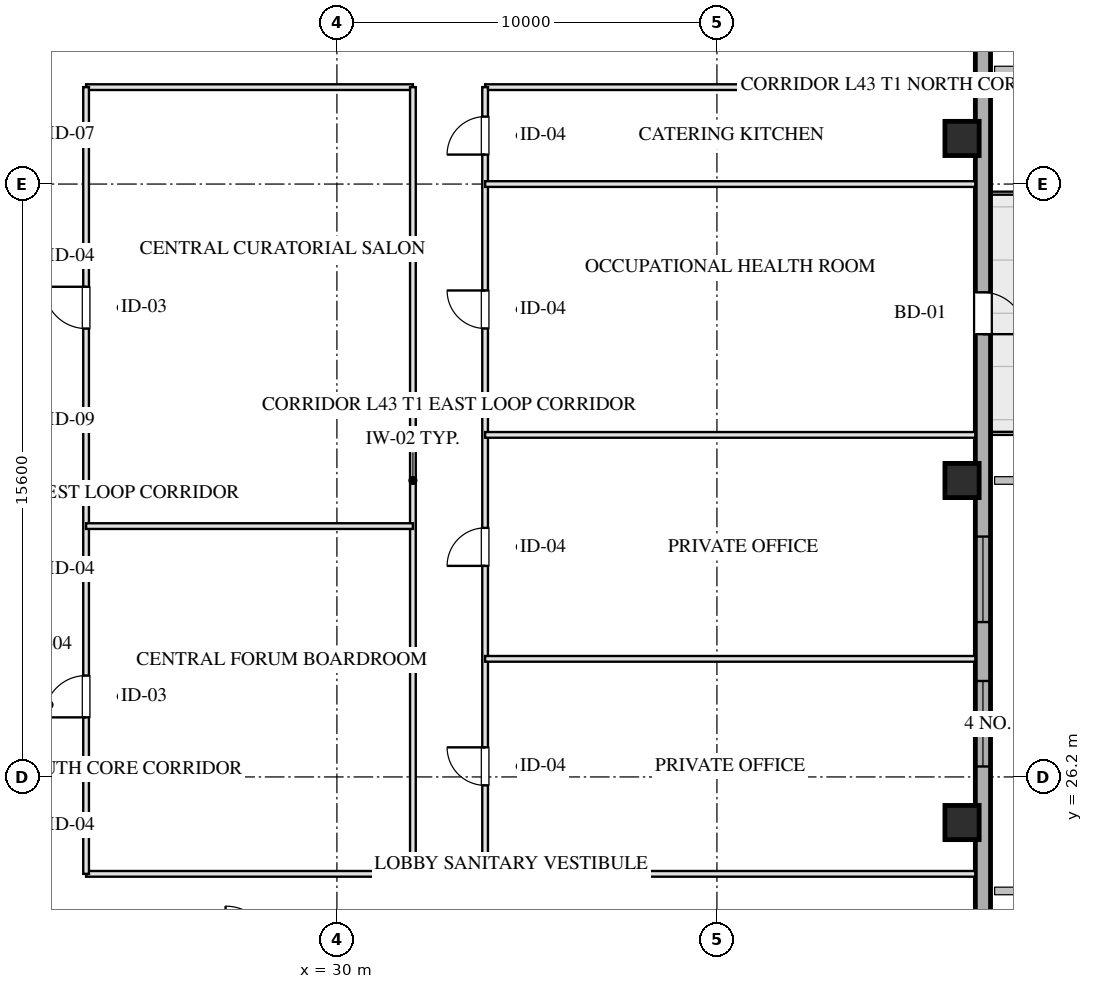
"""IFC4 building model, lengths in metres.
Left out: names, types, materials, properties, quantities, classifications, styles, units other than length and angle.
Written with IfcOpenShell. Run it as: python <this file> out.ifc"""

import sys

from ifc_helpers import new_model, si_unit, direction, frame, frame_2d, origin, origin_2d, place, context, subcontext, project, spatial, rectangle, hollow_rectangle, extrude, element, fill, save


model = new_model("IFC4")
c1 = context("Model", 3, precision=1e-05, world=origin(), true_north=direction((0.0, 1.0)))
c2 = subcontext(c1, "Body", "Model", "MODEL_VIEW")
j1 = project(units=[si_unit("LENGTHUNIT", "METRE"), si_unit("PLANEANGLEUNIT", "RADIAN")], contexts=[c1])
p1 = place(None, origin())
s1 = spatial("IfcSite", under=j1, at=p1, CompositionType="ELEMENT")
p2 = place(p1, origin())
s2 = spatial("IfcBuilding", under=s1, at=p2, CompositionType="ELEMENT")
p3 = place(p2, frame((0.0, 0.0, 163.3)))
s3 = spatial("IfcBuildingStorey", under=s2, at=p3, CompositionType="ELEMENT", Elevation=163.3)
for number, where, z_axis, x_axis in (
    (1, (46.45, 25.0, 0.0), (0.0, 0.0, 1.0), (1.0, 0.0, 0.0)),
    (2, (46.45, 34.0, 0.0), (0.0, 0.0, 1.0), (1.0, 0.0, 0.0)),
    (3, (46.45, 43.0, 0.0), (0.0, 0.0, 1.0), (1.0, 0.0, 0.0)),
):
    element("IfcColumn", number, at=place(p3, frame(where, z_axis=z_axis, x_axis=x_axis)), inside=s3, PredefinedType="COLUMN", context=c2, shape_type="SweptSolid", body=[
        extrude(hollow_rectangle(XDim=0.9, YDim=0.9, WallThickness=0.032, at=origin_2d()), origin(), (0.0, 0.0, 1.0), 3.451),
    ])
p4 = place(p3, frame((47.0, 57.2, 0.0), z_axis=(0.0, 0.0, 1.0), x_axis=(0.0, -1.0, 0.0)))
e4 = element("IfcWall", 4, at=p4, inside=s3, PredefinedType="SOLIDWALL", context=c2, shape_type="SweptSolid", body=[
    extrude(rectangle(XDim=46.4, YDim=0.4, at=frame_2d((23.2, 0.0))), origin(), (0.0, 0.0, 1.0), 2.61),
])
p5 = place(p4, frame((28.475, 0.0, 0.75)))
e5 = element("IfcOpeningElement", 5, at=p5, cuts=e4, PredefinedType="OPENING", context=c2, shape_type="SweptSolid", body=[
    extrude(rectangle(XDim=2.25, YDim=1.46, at=frame_2d((1.125, 0.73))), frame((0.0, 0.21, 0.0), z_axis=(0.0, -1.0, 0.0), x_axis=(1.0, 0.0, 0.0)), (0.0, 0.0, 1.0), 0.42),
])
p6 = place(p4, frame((24.675, 0.0, 0.75)))
e6 = element("IfcOpeningElement", 6, at=p6, cuts=e4, PredefinedType="OPENING", context=c2, shape_type="SweptSolid", body=[
    extrude(rectangle(XDim=2.25, YDim=1.46, at=frame_2d((1.125, 0.73))), frame((0.0, 0.21, 0.0), z_axis=(0.0, -1.0, 0.0), x_axis=(1.0, 0.0, 0.0)), (0.0, 0.0, 1.0), 0.42),
])
p7 = place(p4, frame((18.25, 0.0, 0.0)))
e7 = element("IfcOpeningElement", 7, at=p7, cuts=e4, PredefinedType="OPENING", context=c2, shape_type="SweptSolid", body=[
    extrude(rectangle(XDim=1.1, YDim=2.15, at=frame_2d((0.55, 1.075))), frame((0.0, 0.21, 0.0), z_axis=(0.0, -1.0, 0.0), x_axis=(1.0, 0.0, 0.0)), (0.0, 0.0, 1.0), 0.42),
])
p8 = place(p3, frame((23.4, 23.65, 0.0), z_axis=(0.0, 0.0, 1.0), x_axis=(1.0, 0.0, 0.0)))
e8 = element("IfcWall", 8, at=p8, inside=s3, PredefinedType="PARTITIONING", context=c2, shape_type="SweptSolid", body=[
    extrude(rectangle(XDim=8.6, YDim=0.15, at=frame_2d((4.3, 0.0))), origin(), (0.0, 0.0, 1.0), 3.175),
])
p9 = place(p3, frame((33.9, 23.65, 0.0), z_axis=(0.0, 0.0, 1.0), x_axis=(1.0, 0.0, 0.0)))
e9 = element("IfcWall", 9, at=p9, inside=s3, PredefinedType="PARTITIONING", context=c2, shape_type="SweptSolid", body=[
    extrude(rectangle(XDim=12.9, YDim=0.15, at=frame_2d((6.45, 0.0))), origin(), (0.0, 0.0, 1.0), 3.175),
])
p10 = place(p3, frame((23.4, 44.35, 0.0), z_axis=(0.0, 0.0, 1.0), x_axis=(1.0, 0.0, 0.0)))
e10 = element("IfcWall", 10, at=p10, inside=s3, PredefinedType="PARTITIONING", context=c2, shape_type="SweptSolid", body=[
    extrude(rectangle(XDim=8.6, YDim=0.15, at=frame_2d((4.3, 0.0))), origin(), (0.0, 0.0, 1.0), 3.175),
])
p11 = place(p3, frame((33.9, 44.35, 0.0), z_axis=(0.0, 0.0, 1.0), x_axis=(1.0, 0.0, 0.0)))
e11 = element("IfcWall", 11, at=p11, inside=s3, PredefinedType="PARTITIONING", context=c2, shape_type="SweptSolid", body=[
    extrude(rectangle(XDim=12.9, YDim=0.15, at=frame_2d((6.45, 0.0))), origin(), (0.0, 0.0, 1.0), 3.175),
])
p12 = place(p3, frame((23.4, 23.65, 0.0), z_axis=(0.0, 0.0, 1.0), x_axis=(0.0, 1.0, 0.0)))
e12 = element("IfcWall", 12, at=p12, inside=s3, PredefinedType="PARTITIONING", context=c2, shape_type="SweptSolid", body=[
    extrude(rectangle(XDim=20.7, YDim=0.15, at=frame_2d((10.35, 0.0))), origin(), (0.0, 0.0, 1.0), 3.175),
])
p13 = place(p12, frame((4.117, 0.0, 0.0)))
e13 = element("IfcOpeningElement", 13, at=p13, cuts=e12, PredefinedType="OPENING", context=c2, shape_type="SweptSolid", body=[
    extrude(rectangle(XDim=1.1, YDim=2.05, at=frame_2d((0.55, 1.025))), frame((0.0, 0.085, 0.0), z_axis=(0.0, -1.0, 0.0), x_axis=(1.0, 0.0, 0.0)), (0.0, 0.0, 1.0), 0.17),
])
p14 = place(p12, frame((14.347, 0.0, 0.0)))
e14 = element("IfcOpeningElement", 14, at=p14, cuts=e12, PredefinedType="OPENING", context=c2, shape_type="SweptSolid", body=[
    extrude(rectangle(XDim=1.1, YDim=2.05, at=frame_2d((0.55, 1.025))), frame((0.0, 0.085, 0.0), z_axis=(0.0, -1.0, 0.0), x_axis=(1.0, 0.0, 0.0)), (0.0, 0.0, 1.0), 0.17),
])
p15 = place(p3, frame((32.0, 23.65, 0.0), z_axis=(0.0, 0.0, 1.0), x_axis=(0.0, 1.0, 0.0)))
e15 = element("IfcWall", 15, at=p15, inside=s3, PredefinedType="PARTITIONING", context=c2, shape_type="SweptSolid", body=[
    extrude(rectangle(XDim=20.7, YDim=0.15, at=frame_2d((10.35, 0.0))), origin(), (0.0, 0.0, 1.0), 3.175),
])
p16 = place(p3, frame((33.9, 23.65, 0.0), z_axis=(0.0, 0.0, 1.0), x_axis=(0.0, 1.0, 0.0)))
e16 = element("IfcWall", 16, at=p16, inside=s3, PredefinedType="PARTITIONING", context=c2, shape_type="SweptSolid", body=[
    extrude(rectangle(XDim=20.7, YDim=0.15, at=frame_2d((10.35, 0.0))), origin(), (0.0, 0.0, 1.0), 3.175),
])
p17 = place(p16, frame((2.329, 0.0, 0.0)))
e17 = element("IfcOpeningElement", 17, at=p17, cuts=e16, PredefinedType="OPENING", context=c2, shape_type="SweptSolid", body=[
    extrude(rectangle(XDim=1.0, YDim=2.05, at=frame_2d((0.5, 1.025))), frame((0.0, 0.085, 0.0), z_axis=(0.0, -1.0, 0.0), x_axis=(1.0, 0.0, 0.0)), (0.0, 0.0, 1.0), 0.17),
])
p18 = place(p16, frame((8.104, 0.0, 0.0)))
e18 = element("IfcOpeningElement", 18, at=p18, cuts=e16, PredefinedType="OPENING", context=c2, shape_type="SweptSolid", body=[
    extrude(rectangle(XDim=1.0, YDim=2.05, at=frame_2d((0.5, 1.025))), frame((0.0, 0.085, 0.0), z_axis=(0.0, -1.0, 0.0), x_axis=(1.0, 0.0, 0.0)), (0.0, 0.0, 1.0), 0.17),
])
p19 = place(p16, frame((14.35, 0.0, 0.0)))
e19 = element("IfcOpeningElement", 19, at=p19, cuts=e16, PredefinedType="OPENING", context=c2, shape_type="SweptSolid", body=[
    extrude(rectangle(XDim=1.0, YDim=2.05, at=frame_2d((0.5, 1.025))), frame((0.0, 0.085, 0.0), z_axis=(0.0, -1.0, 0.0), x_axis=(1.0, 0.0, 0.0)), (0.0, 0.0, 1.0), 0.17),
])
p20 = place(p16, frame((18.925, 0.0, 0.0)))
e20 = element("IfcOpeningElement", 20, at=p20, cuts=e16, PredefinedType="OPENING", context=c2, shape_type="SweptSolid", body=[
    extrude(rectangle(XDim=1.0, YDim=2.05, at=frame_2d((0.5, 1.025))), frame((0.0, 0.085, 0.0), z_axis=(0.0, -1.0, 0.0), x_axis=(1.0, 0.0, 0.0)), (0.0, 0.0, 1.0), 0.17),
])
p21 = place(p3, frame((23.4, 32.8, 0.0), z_axis=(0.0, 0.0, 1.0), x_axis=(1.0, 0.0, 0.0)))
e21 = element("IfcWall", 21, at=p21, inside=s3, PredefinedType="PARTITIONING", context=c2, shape_type="SweptSolid", body=[
    extrude(rectangle(XDim=8.6, YDim=0.15, at=frame_2d((4.3, 0.0))), origin(), (0.0, 0.0, 1.0), 3.175),
])
for number, where, z_axis, x_axis in (
    (22, (33.9, 29.307, 0.0), (0.0, 0.0, 1.0), (1.0, 0.0, 0.0)),
    (23, (33.9, 35.2, 0.0), (0.0, 0.0, 1.0), (1.0, 0.0, 0.0)),
    (24, (33.9, 41.8, 0.0), (0.0, 0.0, 1.0), (1.0, 0.0, 0.0)),
):
    element("IfcWall", number, at=place(p3, frame(where, z_axis=z_axis, x_axis=x_axis)), inside=s3, PredefinedType="PARTITIONING", context=c2, shape_type="SweptSolid", body=[
        extrude(rectangle(XDim=12.9, YDim=0.15, at=frame_2d((6.45, 0.0))), origin(), (0.0, 0.0, 1.0), 3.175),
    ])
p22 = place(p5, origin())
e25 = element("IfcWindow", 25, at=p22, inside=s3, PartitioningType="TRIPLE_PANEL_VERTICAL", PredefinedType="WINDOW", context=c2, shape_type="SweptSolid", body=[
    extrude(rectangle(XDim=2.25, YDim=1.46, at=frame_2d((1.125, 0.73))), frame((0.0, 0.03, 0.0), z_axis=(0.0, -1.0, 0.0), x_axis=(1.0, 0.0, 0.0)), (0.0, 0.0, 1.0), 0.06),
])
fill(e5, e25)
p23 = place(p6, origin())
e26 = element("IfcWindow", 26, at=p23, inside=s3, PartitioningType="TRIPLE_PANEL_VERTICAL", PredefinedType="WINDOW", context=c2, shape_type="SweptSolid", body=[
    extrude(rectangle(XDim=2.25, YDim=1.46, at=frame_2d((1.125, 0.73))), frame((0.0, 0.03, 0.0), z_axis=(0.0, -1.0, 0.0), x_axis=(1.0, 0.0, 0.0)), (0.0, 0.0, 1.0), 0.06),
])
fill(e6, e26)
p24 = place(p7, origin())
e27 = element("IfcDoor", 27, at=p24, inside=s3, OperationType="SINGLE_SWING_RIGHT", PredefinedType="DOOR", context=c2, shape_type="SweptSolid", body=[
    extrude(rectangle(XDim=1.1, YDim=2.15, at=frame_2d((0.55, 1.075))), frame((0.0, 0.025, 0.0), z_axis=(0.0, -1.0, 0.0), x_axis=(1.0, 0.0, 0.0)), (0.0, 0.0, 1.0), 0.05),
])
fill(e7, e27)
p25 = place(p13, origin())
e28 = element("IfcDoor", 28, at=p25, inside=s3, OperationType="SINGLE_SWING_LEFT", PredefinedType="DOOR", context=c2, shape_type="SweptSolid", body=[
    extrude(rectangle(XDim=1.1, YDim=2.05, at=frame_2d((0.55, 1.025))), frame((0.0, 0.025, 0.0), z_axis=(0.0, -1.0, 0.0), x_axis=(1.0, 0.0, 0.0)), (0.0, 0.0, 1.0), 0.05),
])
fill(e13, e28)
p26 = place(p14, origin())
e29 = element("IfcDoor", 29, at=p26, inside=s3, OperationType="SINGLE_SWING_RIGHT", PredefinedType="DOOR", context=c2, shape_type="SweptSolid", body=[
    extrude(rectangle(XDim=1.1, YDim=2.05, at=frame_2d((0.55, 1.025))), frame((0.0, 0.025, 0.0), z_axis=(0.0, -1.0, 0.0), x_axis=(1.0, 0.0, 0.0)), (0.0, 0.0, 1.0), 0.05),
])
fill(e14, e29)
p27 = place(p17, origin())
e30 = element("IfcDoor", 30, at=p27, inside=s3, OperationType="SINGLE_SWING_RIGHT", PredefinedType="DOOR", context=c2, shape_type="SweptSolid", body=[
    extrude(rectangle(XDim=1.0, YDim=2.05, at=frame_2d((0.5, 1.025))), frame((0.0, 0.025, 0.0), z_axis=(0.0, -1.0, 0.0), x_axis=(1.0, 0.0, 0.0)), (0.0, 0.0, 1.0), 0.05),
])
fill(e17, e30)
p28 = place(p18, origin())
e31 = element("IfcDoor", 31, at=p28, inside=s3, OperationType="SINGLE_SWING_LEFT", PredefinedType="DOOR", context=c2, shape_type="SweptSolid", body=[
    extrude(rectangle(XDim=1.0, YDim=2.05, at=frame_2d((0.5, 1.025))), frame((0.0, 0.025, 0.0), z_axis=(0.0, -1.0, 0.0), x_axis=(1.0, 0.0, 0.0)), (0.0, 0.0, 1.0), 0.05),
])
fill(e18, e31)
p29 = place(p19, origin())
e32 = element("IfcDoor", 32, at=p29, inside=s3, OperationType="SINGLE_SWING_RIGHT", PredefinedType="DOOR", context=c2, shape_type="SweptSolid", body=[
    extrude(rectangle(XDim=1.0, YDim=2.05, at=frame_2d((0.5, 1.025))), frame((0.0, 0.025, 0.0), z_axis=(0.0, -1.0, 0.0), x_axis=(1.0, 0.0, 0.0)), (0.0, 0.0, 1.0), 0.05),
])
fill(e19, e32)
p30 = place(p20, origin())
e33 = element("IfcDoor", 33, at=p30, inside=s3, OperationType="SINGLE_SWING_LEFT", PredefinedType="DOOR", context=c2, shape_type="SweptSolid", body=[
    extrude(rectangle(XDim=1.0, YDim=2.05, at=frame_2d((0.5, 1.025))), frame((0.0, 0.025, 0.0), z_axis=(0.0, -1.0, 0.0), x_axis=(1.0, 0.0, 0.0)), (0.0, 0.0, 1.0), 0.05),
])
fill(e20, e33)
save(model, sys.argv[1])
